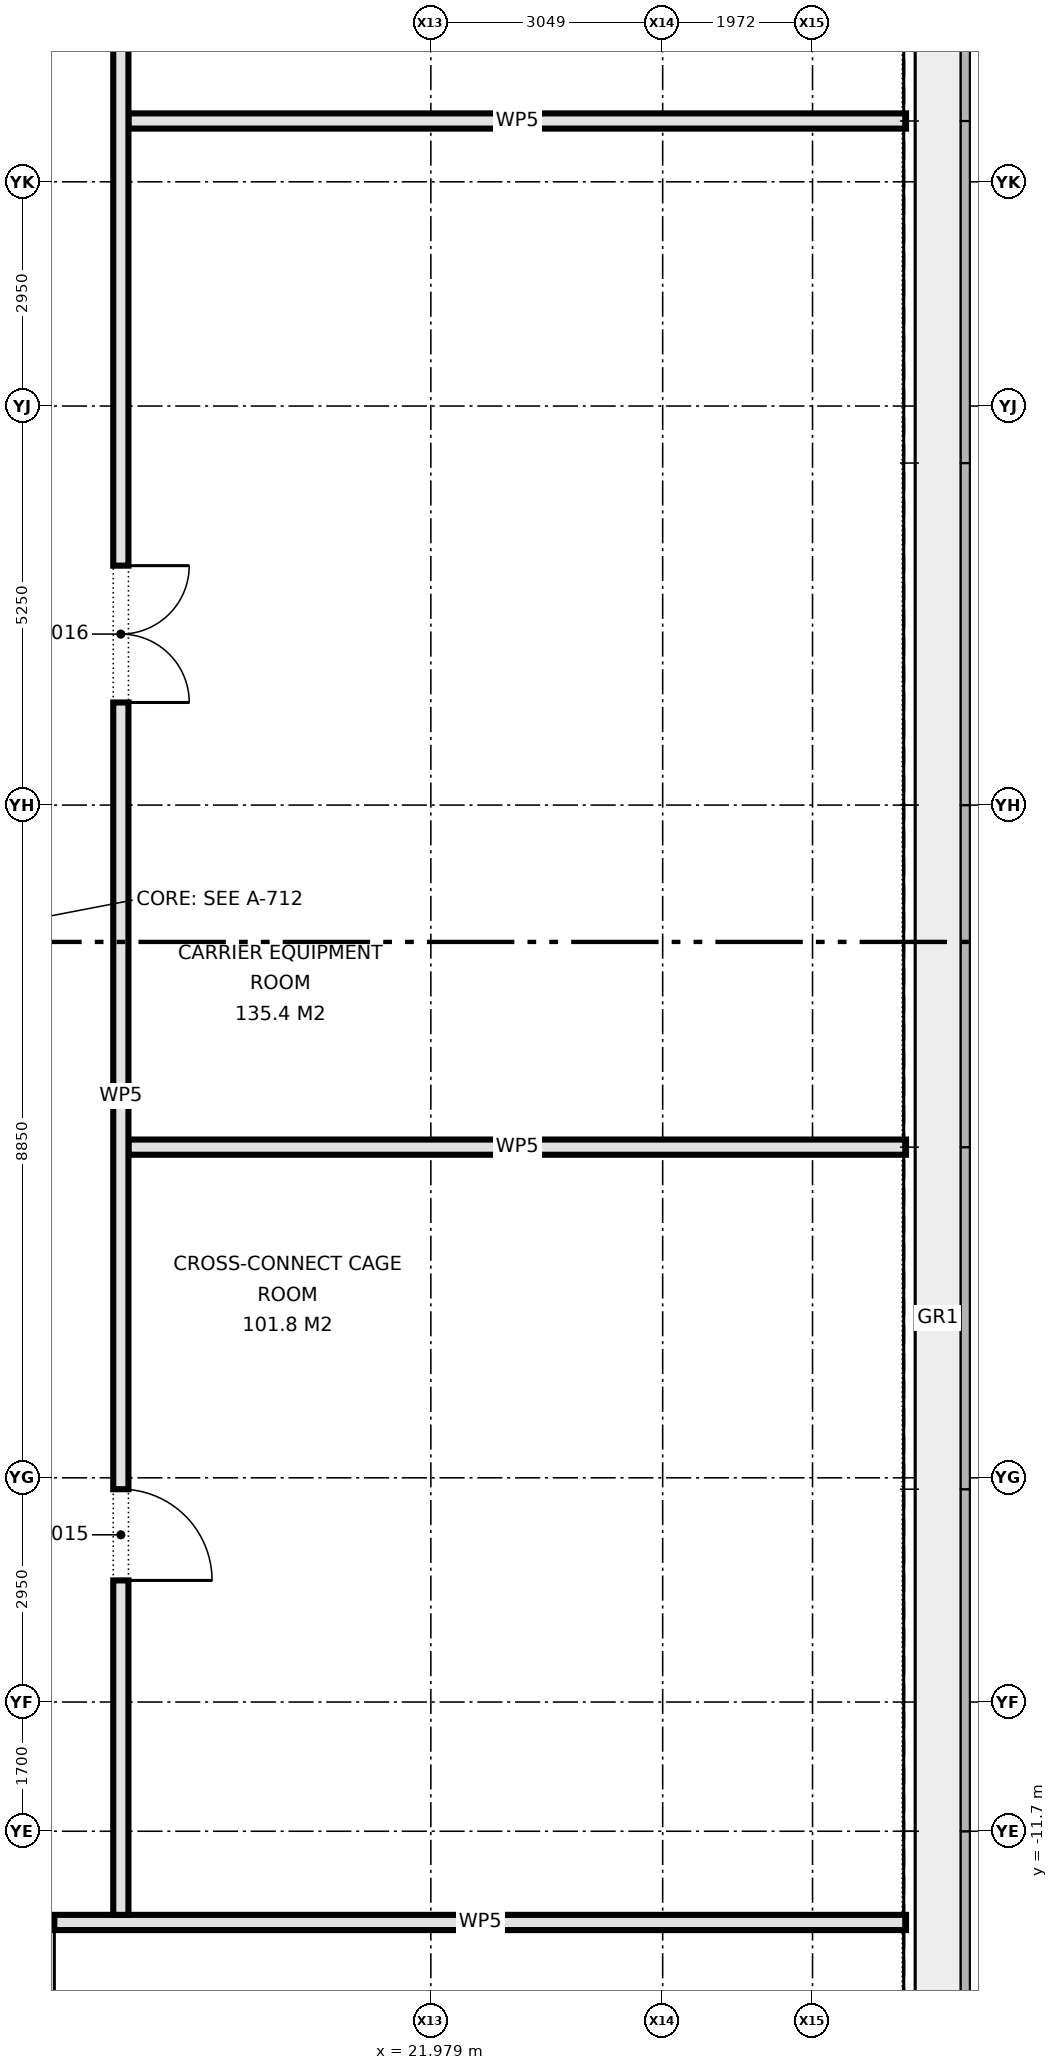
"""IFC4 building model, lengths in metres.
Left out: names, types, materials, properties, quantities, classifications, styles, units other than length and angle.
Written with IfcOpenShell. Run it as: python <this file> out.ifc"""

import sys

from ifc_helpers import new_model, si_unit, direction, frame, frame_2d, origin, place, context, subcontext, project, spatial, rectangle, extrude, element, fill, save


model = new_model("IFC4")
c1 = context("Model", 3, precision=1e-05, world=origin(), true_north=direction((0.0, 1.0)))
c2 = subcontext(c1, "Body", "Model", "MODEL_VIEW")
j1 = project(units=[si_unit("LENGTHUNIT", "METRE"), si_unit("PLANEANGLEUNIT", "RADIAN")], contexts=[c1])
p1 = place(None, origin())
s1 = spatial("IfcSite", under=j1, at=p1, CompositionType="ELEMENT")
p2 = place(p1, origin())
s2 = spatial("IfcBuilding", under=s1, at=p2, CompositionType="ELEMENT")
p3 = place(p2, frame((0.0, 0.0, 77.6)))
s3 = spatial("IfcBuildingStorey", under=s2, at=p3, CompositionType="ELEMENT", Elevation=77.6)
p4 = place(p3, frame((-20.33, -12.9, 0.0), z_axis=(0.0, 0.0, 1.0), x_axis=(1.0, 0.0, 0.0)))
e1 = element("IfcWall", 1, at=p4, inside=s3, PredefinedType="PARTITIONING", context=c2, shape_type="SweptSolid", body=[
    extrude(rectangle(XDim=48.56, YDim=0.2, at=frame_2d((24.28, 0.0))), origin(), (0.0, 0.0, 1.0), 4.2),
])
p5 = place(p4, frame((3.39, 0.0, 0.0)))
e2 = element("IfcOpeningElement", 2, at=p5, cuts=e1, PredefinedType="OPENING", context=c2, shape_type="SweptSolid", body=[
    extrude(rectangle(XDim=1.8, YDim=2.1, at=frame_2d((0.9, 1.05))), frame((0.0, 0.11, 0.0), z_axis=(0.0, -1.0, 0.0), x_axis=(1.0, 0.0, 0.0)), (0.0, 0.0, 1.0), 0.22),
])
p6 = place(p4, frame((15.83, 0.0, 0.0)))
e3 = element("IfcOpeningElement", 3, at=p6, cuts=e1, PredefinedType="OPENING", context=c2, shape_type="SweptSolid", body=[
    extrude(rectangle(XDim=1.8, YDim=2.1, at=frame_2d((0.9, 1.05))), frame((0.0, 0.11, 0.0), z_axis=(0.0, -1.0, 0.0), x_axis=(1.0, 0.0, 0.0)), (0.0, 0.0, 1.0), 0.22),
])
p7 = place(p4, frame((9.38, 0.0, 0.0)))
e4 = element("IfcOpeningElement", 4, at=p7, cuts=e1, PredefinedType="OPENING", context=c2, shape_type="SweptSolid", body=[
    extrude(rectangle(XDim=1.2, YDim=2.1, at=frame_2d((0.6, 1.05))), frame((0.0, 0.11, 0.0), z_axis=(0.0, -1.0, 0.0), x_axis=(1.0, 0.0, 0.0)), (0.0, 0.0, 1.0), 0.22),
])
p8 = place(p4, frame((32.15, 0.0, 0.0)))
e5 = element("IfcOpeningElement", 5, at=p8, cuts=e1, PredefinedType="OPENING", context=c2, shape_type="SweptSolid", body=[
    extrude(rectangle(XDim=1.2, YDim=2.1, at=frame_2d((0.6, 1.05))), frame((0.0, 0.11, 0.0), z_axis=(0.0, -1.0, 0.0), x_axis=(1.0, 0.0, 0.0)), (0.0, 0.0, 1.0), 0.22),
])
p9 = place(p4, frame((36.155, 0.0, 0.0)))
e6 = element("IfcOpeningElement", 6, at=p9, cuts=e1, PredefinedType="OPENING", context=c2, shape_type="SweptSolid", body=[
    extrude(rectangle(XDim=1.2, YDim=2.1, at=frame_2d((0.6, 1.05))), frame((0.0, 0.11, 0.0), z_axis=(0.0, -1.0, 0.0), x_axis=(1.0, 0.0, 0.0)), (0.0, 0.0, 1.0), 0.22),
])
p10 = place(p4, frame((23.03, 0.0, 0.0)))
e7 = element("IfcOpeningElement", 7, at=p10, cuts=e1, PredefinedType="OPENING", context=c2, shape_type="SweptSolid", body=[
    extrude(rectangle(XDim=1.0, YDim=2.1, at=frame_2d((0.5, 1.05))), frame((0.0, 0.11, 0.0), z_axis=(0.0, -1.0, 0.0), x_axis=(1.0, 0.0, 0.0)), (0.0, 0.0, 1.0), 0.22),
])
p11 = place(p4, frame((26.03, 0.0, 0.0)))
e8 = element("IfcOpeningElement", 8, at=p11, cuts=e1, PredefinedType="OPENING", context=c2, shape_type="SweptSolid", body=[
    extrude(rectangle(XDim=1.0, YDim=2.1, at=frame_2d((0.5, 1.05))), frame((0.0, 0.11, 0.0), z_axis=(0.0, -1.0, 0.0), x_axis=(1.0, 0.0, 0.0)), (0.0, 0.0, 1.0), 0.22),
])
p12 = place(p4, frame((28.63, 0.0, 0.0)))
e9 = element("IfcOpeningElement", 9, at=p12, cuts=e1, PredefinedType="OPENING", context=c2, shape_type="SweptSolid", body=[
    extrude(rectangle(XDim=1.0, YDim=2.1, at=frame_2d((0.5, 1.05))), frame((0.0, 0.11, 0.0), z_axis=(0.0, -1.0, 0.0), x_axis=(1.0, 0.0, 0.0)), (0.0, 0.0, 1.0), 0.22),
])
for number, where, z_axis, x_axis in (
    (10, (18.0, -2.7, 0.0), (0.0, 0.0, 1.0), (1.0, 0.0, 0.0)),
    (11, (18.0, 10.8, 0.0), (0.0, 0.0, 1.0), (1.0, 0.0, 0.0)),
):
    element("IfcWall", number, at=place(p3, frame(where, z_axis=z_axis, x_axis=x_axis)), inside=s3, PredefinedType="PARTITIONING", context=c2, shape_type="SweptSolid", body=[
        extrude(rectangle(XDim=10.23, YDim=0.2, at=frame_2d((5.115, 0.0))), origin(), (0.0, 0.0, 1.0), 4.2),
    ])
p13 = place(p3, frame((17.9, -12.8, 0.0), z_axis=(0.0, 0.0, 1.0), x_axis=(0.0, 1.0, 0.0)))
e12 = element("IfcWall", 12, at=p13, inside=s3, PredefinedType="PARTITIONING", context=c2, shape_type="SweptSolid", body=[
    extrude(rectangle(XDim=25.6, YDim=0.2, at=frame_2d((12.8, 0.0))), origin(), (0.0, 0.0, 1.0), 4.2),
])
p14 = place(p13, frame((4.4, 0.0, 0.0)))
e13 = element("IfcOpeningElement", 13, at=p14, cuts=e12, PredefinedType="OPENING", context=c2, shape_type="SweptSolid", body=[
    extrude(rectangle(XDim=1.2, YDim=2.1, at=frame_2d((0.6, 1.05))), frame((0.0, 0.11, 0.0), z_axis=(0.0, -1.0, 0.0), x_axis=(1.0, 0.0, 0.0)), (0.0, 0.0, 1.0), 0.22),
])
p15 = place(p13, frame((15.95, 0.0, 0.0)))
e14 = element("IfcOpeningElement", 14, at=p15, cuts=e12, PredefinedType="OPENING", context=c2, shape_type="SweptSolid", body=[
    extrude(rectangle(XDim=1.8, YDim=2.1, at=frame_2d((0.9, 1.05))), frame((0.0, 0.11, 0.0), z_axis=(0.0, -1.0, 0.0), x_axis=(1.0, 0.0, 0.0)), (0.0, 0.0, 1.0), 0.22),
])
p16 = place(p9, frame((1.2, 0.0, 0.0), z_axis=(0.0, 0.0, 1.0), x_axis=(-1.0, 0.0, 0.0)))
e15 = element("IfcDoor", 15, at=p16, inside=s3, OperationType="SINGLE_SWING_LEFT", PredefinedType="DOOR", context=c2, shape_type="SweptSolid", body=[
    extrude(rectangle(XDim=1.2, YDim=2.1, at=frame_2d((0.6, 1.05))), frame((0.0, 0.025, 0.0), z_axis=(0.0, -1.0, 0.0), x_axis=(1.0, 0.0, 0.0)), (0.0, 0.0, 1.0), 0.05),
])
fill(e6, e15)
p17 = place(p14, frame((1.2, 0.0, 0.0), z_axis=(0.0, 0.0, 1.0), x_axis=(-1.0, 0.0, 0.0)))
e16 = element("IfcDoor", 16, at=p17, inside=s3, OperationType="SINGLE_SWING_RIGHT", PredefinedType="DOOR", context=c2, shape_type="SweptSolid", body=[
    extrude(rectangle(XDim=1.2, YDim=2.1, at=frame_2d((0.6, 1.05))), frame((0.0, 0.025, 0.0), z_axis=(0.0, -1.0, 0.0), x_axis=(1.0, 0.0, 0.0)), (0.0, 0.0, 1.0), 0.05),
])
fill(e13, e16)
p18 = place(p15, frame((1.8, 0.0, 0.0), z_axis=(0.0, 0.0, 1.0), x_axis=(-1.0, 0.0, 0.0)))
e17 = element("IfcDoor", 17, at=p18, inside=s3, OperationType="DOUBLE_DOOR_SINGLE_SWING", PredefinedType="DOOR", context=c2, shape_type="SweptSolid", body=[
    extrude(rectangle(XDim=1.8, YDim=2.1, at=frame_2d((0.9, 1.05))), frame((0.0, 0.025, 0.0), z_axis=(0.0, -1.0, 0.0), x_axis=(1.0, 0.0, 0.0)), (0.0, 0.0, 1.0), 0.05),
])
fill(e14, e17)
save(model, sys.argv[1])
